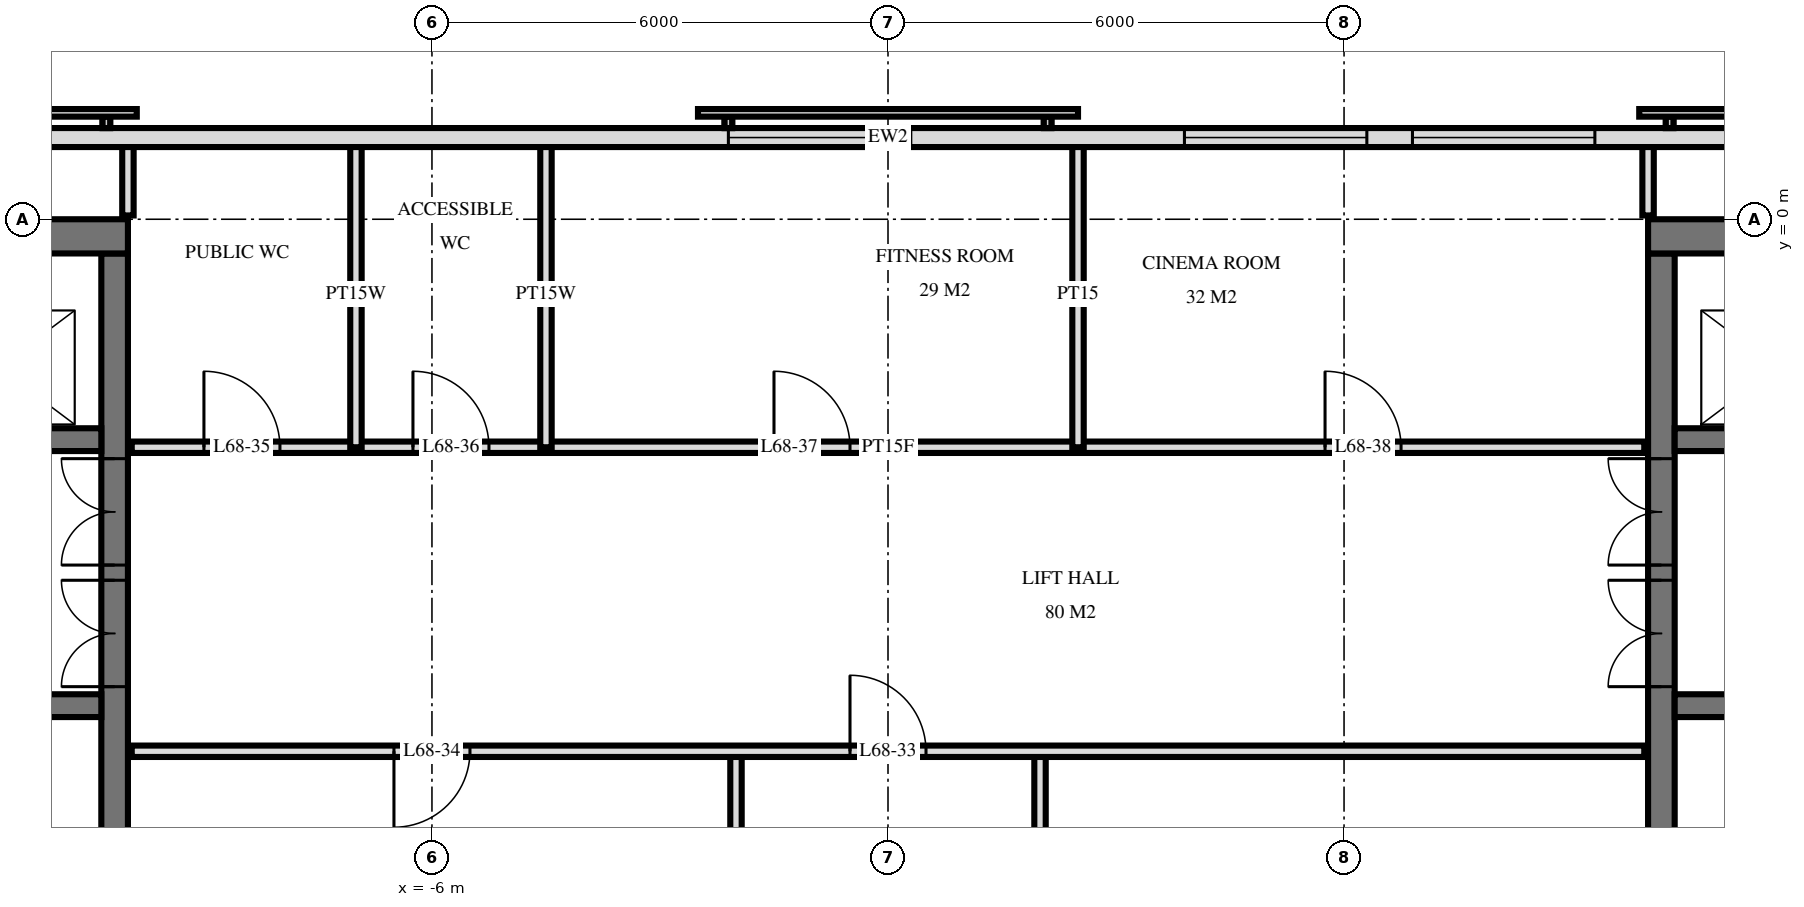
"""IFC4 building model, lengths in metres.
Left out: names, types, materials, properties, quantities, classifications, styles, units other than length and angle.
Written with IfcOpenShell. Run it as: python <this file> out.ifc"""

import sys

from ifc_helpers import new_model, si_unit, direction, frame, frame_2d, origin, place, context, subcontext, project, spatial, rectangle, extrude, element, fill, save


model = new_model("IFC4")
c1 = context("Model", 3, precision=1e-05, world=origin(), true_north=direction((0.0, 1.0)))
c2 = subcontext(c1, "Body", "Model", "MODEL_VIEW")
j1 = project(units=[si_unit("LENGTHUNIT", "METRE"), si_unit("PLANEANGLEUNIT", "RADIAN")], contexts=[c1])
p1 = place(None, origin())
s1 = spatial("IfcSite", under=j1, at=p1, CompositionType="ELEMENT")
p2 = place(p1, origin())
s2 = spatial("IfcBuilding", under=s1, at=p2, CompositionType="ELEMENT")
p3 = place(p2, frame((0.0, 0.0, 259.6)))
s3 = spatial("IfcBuildingStorey", under=s2, at=p3, CompositionType="ELEMENT", Elevation=259.6)
p4 = place(p3, frame((-19.5, -0.225, 0.0), z_axis=(0.0, 0.0, 1.0), x_axis=(1.0, 0.0, 0.0)))
e1 = element("IfcWall", 1, at=p4, inside=s3, PredefinedType="SHEAR", context=c2, shape_type="SweptSolid", body=[
    extrude(rectangle(XDim=9.5, YDim=0.45, at=frame_2d((4.75, 0.0))), origin(), (0.0, 0.0, 1.0), 3.5),
])
p5 = place(p3, frame((-10.175, -14.55, 0.0), z_axis=(0.0, 0.0, 1.0), x_axis=(0.0, 1.0, 0.0)))
e2 = element("IfcWall", 2, at=p5, inside=s3, PredefinedType="SHEAR", context=c2, shape_type="SweptSolid", body=[
    extrude(rectangle(XDim=14.1, YDim=0.35, at=frame_2d((7.05, 0.0))), origin(), (0.0, 0.0, 1.0), 3.5),
])
p6 = place(p5, frame((8.4, 0.0, 0.0)))
e3 = element("IfcOpeningElement", 3, at=p6, cuts=e2, PredefinedType="OPENING", context=c2, shape_type="SweptSolid", body=[
    extrude(rectangle(XDim=1.4, YDim=2.4, at=frame_2d((0.7, 1.2))), frame((0.0, 0.185, 0.0), z_axis=(0.0, -1.0, 0.0), x_axis=(1.0, 0.0, 0.0)), (0.0, 0.0, 1.0), 0.37),
])
p7 = place(p5, frame((10.0, 0.0, 0.0)))
e4 = element("IfcOpeningElement", 4, at=p7, cuts=e2, PredefinedType="OPENING", context=c2, shape_type="SweptSolid", body=[
    extrude(rectangle(XDim=1.4, YDim=2.4, at=frame_2d((0.7, 1.2))), frame((0.0, 0.185, 0.0), z_axis=(0.0, -1.0, 0.0), x_axis=(1.0, 0.0, 0.0)), (0.0, 0.0, 1.0), 0.37),
])
p8 = place(p5, frame((4.0, 0.0, 0.0)))
e5 = element("IfcOpeningElement", 5, at=p8, cuts=e2, PredefinedType="OPENING", context=c2, shape_type="SweptSolid", body=[
    extrude(rectangle(XDim=1.2, YDim=2.1, at=frame_2d((0.6, 1.05))), frame((0.0, 0.185, 0.0), z_axis=(0.0, -1.0, 0.0), x_axis=(1.0, 0.0, 0.0)), (0.0, 0.0, 1.0), 0.37),
])
p9 = place(p3, frame((-19.05, -2.9, 0.0), z_axis=(0.0, 0.0, 1.0), x_axis=(1.0, 0.0, 0.0)))
e6 = element("IfcWall", 6, at=p9, inside=s3, PredefinedType="SHEAR", context=c2, shape_type="SweptSolid", body=[
    extrude(rectangle(XDim=8.7, YDim=0.3, at=frame_2d((4.35, 0.0))), origin(), (0.0, 0.0, 1.0), 3.5),
])
p10 = place(p9, frame((6.8, 0.0, 0.0)))
e7 = element("IfcOpeningElement", 7, at=p10, cuts=e6, PredefinedType="OPENING", context=c2, shape_type="SweptSolid", body=[
    extrude(rectangle(XDim=1.1, YDim=2.1, at=frame_2d((0.55, 1.05))), frame((0.0, 0.16, 0.0), z_axis=(0.0, -1.0, 0.0), x_axis=(1.0, 0.0, 0.0)), (0.0, 0.0, 1.0), 0.32),
])
p11 = place(p9, frame((3.8, 0.0, 0.0)))
e8 = element("IfcOpeningElement", 8, at=p11, cuts=e6, PredefinedType="OPENING", context=c2, shape_type="SweptSolid", body=[
    extrude(rectangle(XDim=1.1, YDim=2.1, at=frame_2d((0.55, 1.05))), frame((0.0, 0.16, 0.0), z_axis=(0.0, -1.0, 0.0), x_axis=(1.0, 0.0, 0.0)), (0.0, 0.0, 1.0), 0.32),
])
p12 = place(p9, frame((1.863, 0.0, 0.0)))
e9 = element("IfcOpeningElement", 9, at=p12, cuts=e6, PredefinedType="OPENING", context=c2, shape_type="SweptSolid", body=[
    extrude(rectangle(XDim=0.9, YDim=2.1, at=frame_2d((0.45, 1.05))), frame((0.0, 0.16, 0.0), z_axis=(0.0, -1.0, 0.0), x_axis=(1.0, 0.0, 0.0)), (0.0, 0.0, 1.0), 0.32),
])
p13 = place(p9, frame((0.438, 0.0, 0.0)))
e10 = element("IfcOpeningElement", 10, at=p13, cuts=e6, PredefinedType="OPENING", context=c2, shape_type="SweptSolid", body=[
    extrude(rectangle(XDim=0.9, YDim=2.1, at=frame_2d((0.45, 1.05))), frame((0.0, 0.16, 0.0), z_axis=(0.0, -1.0, 0.0), x_axis=(1.0, 0.0, 0.0)), (0.0, 0.0, 1.0), 0.32),
])
p14 = place(p3, frame((-19.05, -6.4, 0.0), z_axis=(0.0, 0.0, 1.0), x_axis=(1.0, 0.0, 0.0)))
e11 = element("IfcWall", 11, at=p14, inside=s3, PredefinedType="SHEAR", context=c2, shape_type="SweptSolid", body=[
    extrude(rectangle(XDim=8.7, YDim=0.3, at=frame_2d((4.35, 0.0))), origin(), (0.0, 0.0, 1.0), 3.5),
])
p15 = place(p14, frame((0.8, 0.0, 0.0)))
e12 = element("IfcOpeningElement", 12, at=p15, cuts=e11, PredefinedType="OPENING", context=c2, shape_type="SweptSolid", body=[
    extrude(rectangle(XDim=1.1, YDim=2.1, at=frame_2d((0.55, 1.05))), frame((0.0, 0.16, 0.0), z_axis=(0.0, -1.0, 0.0), x_axis=(1.0, 0.0, 0.0)), (0.0, 0.0, 1.0), 0.32),
])
p16 = place(p3, frame((10.0, -0.225, 0.0), z_axis=(0.0, 0.0, 1.0), x_axis=(1.0, 0.0, 0.0)))
e13 = element("IfcWall", 13, at=p16, inside=s3, PredefinedType="SHEAR", context=c2, shape_type="SweptSolid", body=[
    extrude(rectangle(XDim=9.5, YDim=0.45, at=frame_2d((4.75, 0.0))), origin(), (0.0, 0.0, 1.0), 3.5),
])
p17 = place(p3, frame((10.175, -14.55, 0.0), z_axis=(0.0, 0.0, 1.0), x_axis=(0.0, 1.0, 0.0)))
e14 = element("IfcWall", 14, at=p17, inside=s3, PredefinedType="SHEAR", context=c2, shape_type="SweptSolid", body=[
    extrude(rectangle(XDim=14.1, YDim=0.35, at=frame_2d((7.05, 0.0))), origin(), (0.0, 0.0, 1.0), 3.5),
])
p18 = place(p17, frame((8.4, 0.0, 0.0)))
e15 = element("IfcOpeningElement", 15, at=p18, cuts=e14, PredefinedType="OPENING", context=c2, shape_type="SweptSolid", body=[
    extrude(rectangle(XDim=1.4, YDim=2.4, at=frame_2d((0.7, 1.2))), frame((0.0, 0.185, 0.0), z_axis=(0.0, -1.0, 0.0), x_axis=(1.0, 0.0, 0.0)), (0.0, 0.0, 1.0), 0.37),
])
p19 = place(p17, frame((10.0, 0.0, 0.0)))
e16 = element("IfcOpeningElement", 16, at=p19, cuts=e14, PredefinedType="OPENING", context=c2, shape_type="SweptSolid", body=[
    extrude(rectangle(XDim=1.4, YDim=2.4, at=frame_2d((0.7, 1.2))), frame((0.0, 0.185, 0.0), z_axis=(0.0, -1.0, 0.0), x_axis=(1.0, 0.0, 0.0)), (0.0, 0.0, 1.0), 0.37),
])
p20 = place(p17, frame((4.0, 0.0, 0.0)))
e17 = element("IfcOpeningElement", 17, at=p20, cuts=e14, PredefinedType="OPENING", context=c2, shape_type="SweptSolid", body=[
    extrude(rectangle(XDim=1.2, YDim=2.1, at=frame_2d((0.6, 1.05))), frame((0.0, 0.185, 0.0), z_axis=(0.0, -1.0, 0.0), x_axis=(1.0, 0.0, 0.0)), (0.0, 0.0, 1.0), 0.37),
])
p21 = place(p3, frame((10.35, -2.9, 0.0), z_axis=(0.0, 0.0, 1.0), x_axis=(1.0, 0.0, 0.0)))
e18 = element("IfcWall", 18, at=p21, inside=s3, PredefinedType="SHEAR", context=c2, shape_type="SweptSolid", body=[
    extrude(rectangle(XDim=8.7, YDim=0.3, at=frame_2d((4.35, 0.0))), origin(), (0.0, 0.0, 1.0), 3.5),
])
p22 = place(p21, frame((0.8, 0.0, 0.0)))
e19 = element("IfcOpeningElement", 19, at=p22, cuts=e18, PredefinedType="OPENING", context=c2, shape_type="SweptSolid", body=[
    extrude(rectangle(XDim=1.1, YDim=2.1, at=frame_2d((0.55, 1.05))), frame((0.0, 0.16, 0.0), z_axis=(0.0, -1.0, 0.0), x_axis=(1.0, 0.0, 0.0)), (0.0, 0.0, 1.0), 0.32),
])
p23 = place(p21, frame((3.8, 0.0, 0.0)))
e20 = element("IfcOpeningElement", 20, at=p23, cuts=e18, PredefinedType="OPENING", context=c2, shape_type="SweptSolid", body=[
    extrude(rectangle(XDim=1.1, YDim=2.1, at=frame_2d((0.55, 1.05))), frame((0.0, 0.16, 0.0), z_axis=(0.0, -1.0, 0.0), x_axis=(1.0, 0.0, 0.0)), (0.0, 0.0, 1.0), 0.32),
])
p24 = place(p21, frame((5.938, 0.0, 0.0)))
e21 = element("IfcOpeningElement", 21, at=p24, cuts=e18, PredefinedType="OPENING", context=c2, shape_type="SweptSolid", body=[
    extrude(rectangle(XDim=0.9, YDim=2.1, at=frame_2d((0.45, 1.05))), frame((0.0, 0.16, 0.0), z_axis=(0.0, -1.0, 0.0), x_axis=(1.0, 0.0, 0.0)), (0.0, 0.0, 1.0), 0.32),
])
p25 = place(p21, frame((7.363, 0.0, 0.0)))
e22 = element("IfcOpeningElement", 22, at=p25, cuts=e18, PredefinedType="OPENING", context=c2, shape_type="SweptSolid", body=[
    extrude(rectangle(XDim=0.9, YDim=2.1, at=frame_2d((0.45, 1.05))), frame((0.0, 0.16, 0.0), z_axis=(0.0, -1.0, 0.0), x_axis=(1.0, 0.0, 0.0)), (0.0, 0.0, 1.0), 0.32),
])
p26 = place(p3, frame((10.35, -6.4, 0.0), z_axis=(0.0, 0.0, 1.0), x_axis=(1.0, 0.0, 0.0)))
e23 = element("IfcWall", 23, at=p26, inside=s3, PredefinedType="SHEAR", context=c2, shape_type="SweptSolid", body=[
    extrude(rectangle(XDim=8.7, YDim=0.3, at=frame_2d((4.35, 0.0))), origin(), (0.0, 0.0, 1.0), 3.5),
])
p27 = place(p26, frame((6.8, 0.0, 0.0)))
e24 = element("IfcOpeningElement", 24, at=p27, cuts=e23, PredefinedType="OPENING", context=c2, shape_type="SweptSolid", body=[
    extrude(rectangle(XDim=1.1, YDim=2.1, at=frame_2d((0.55, 1.05))), frame((0.0, 0.16, 0.0), z_axis=(0.0, -1.0, 0.0), x_axis=(1.0, 0.0, 0.0)), (0.0, 0.0, 1.0), 0.32),
])
p28 = place(p3, frame((18.575, 1.075, 0.0), z_axis=(0.0, 0.0, 1.0), x_axis=(-1.0, 0.0, 0.0)))
e25 = element("IfcWall", 25, at=p28, inside=s3, PredefinedType="SOLIDWALL", context=c2, shape_type="SweptSolid", body=[
    extrude(rectangle(XDim=37.151, YDim=0.25, at=frame_2d((18.575, 0.0))), origin(), (0.0, 0.0, 1.0), 3.22),
])
p29 = place(p28, frame((9.275, 0.0, 0.9)))
e26 = element("IfcOpeningElement", 26, at=p29, cuts=e25, PredefinedType="OPENING", context=c2, shape_type="SweptSolid", body=[
    extrude(rectangle(XDim=2.4, YDim=1.5, at=frame_2d((1.2, 0.75))), frame((0.0, 0.135, 0.0), z_axis=(0.0, -1.0, 0.0), x_axis=(1.0, 0.0, 0.0)), (0.0, 0.0, 1.0), 0.27),
])
p30 = place(p28, frame((12.275, 0.0, 0.9)))
e27 = element("IfcOpeningElement", 27, at=p30, cuts=e25, PredefinedType="OPENING", context=c2, shape_type="SweptSolid", body=[
    extrude(rectangle(XDim=2.4, YDim=1.5, at=frame_2d((1.2, 0.75))), frame((0.0, 0.135, 0.0), z_axis=(0.0, -1.0, 0.0), x_axis=(1.0, 0.0, 0.0)), (0.0, 0.0, 1.0), 0.27),
])
p31 = place(p28, frame((18.275, 0.0, 0.9)))
e28 = element("IfcOpeningElement", 28, at=p31, cuts=e25, PredefinedType="OPENING", context=c2, shape_type="SweptSolid", body=[
    extrude(rectangle(XDim=2.4, YDim=1.5, at=frame_2d((1.2, 0.75))), frame((0.0, 0.135, 0.0), z_axis=(0.0, -1.0, 0.0), x_axis=(1.0, 0.0, 0.0)), (0.0, 0.0, 1.0), 0.27),
])
p32 = place(p3, frame((10.0, 0.05, 0.0), z_axis=(0.0, 0.0, 1.0), x_axis=(0.0, 1.0, 0.0)))
e29 = element("IfcWall", 29, at=p32, inside=s3, PredefinedType="PARTITIONING", context=c2, shape_type="SweptSolid", body=[
    extrude(rectangle(XDim=0.97, YDim=0.15, at=frame_2d((0.485, 0.0))), origin(), (0.0, 0.0, 1.0), 3.22),
])
p33 = place(p3, frame((2.5, -3.0, 0.0), z_axis=(0.0, 0.0, 1.0), x_axis=(0.0, 1.0, 0.0)))
e30 = element("IfcWall", 30, at=p33, inside=s3, PredefinedType="PARTITIONING", context=c2, shape_type="SweptSolid", body=[
    extrude(rectangle(XDim=4.02, YDim=0.15, at=frame_2d((2.01, 0.0))), origin(), (0.0, 0.0, 1.0), 3.22),
])
for number, where, z_axis, x_axis in (
    (31, (2.0, -11.0, 0.0), (0.0, 0.0, 1.0), (0.0, 1.0, 0.0)),
    (32, (-2.0, -11.0, 0.0), (0.0, 0.0, 1.0), (0.0, 1.0, 0.0)),
):
    element("IfcWall", number, at=place(p3, frame(where, z_axis=z_axis, x_axis=x_axis)), inside=s3, PredefinedType="PARTITIONING", context=c2, shape_type="SweptSolid", body=[
        extrude(rectangle(XDim=4.0, YDim=0.15, at=frame_2d((2.0, 0.0))), origin(), (0.0, 0.0, 1.0), 3.22),
    ])
for number, where, z_axis, x_axis in (
    (33, (-4.5, -3.0, 0.0), (0.0, 0.0, 1.0), (0.0, 1.0, 0.0)),
    (34, (-7.0, -3.0, 0.0), (0.0, 0.0, 1.0), (0.0, 1.0, 0.0)),
):
    element("IfcWall", number, at=place(p3, frame(where, z_axis=z_axis, x_axis=x_axis)), inside=s3, PredefinedType="PLUMBINGWALL", context=c2, shape_type="SweptSolid", body=[
        extrude(rectangle(XDim=4.02, YDim=0.15, at=frame_2d((2.01, 0.0))), origin(), (0.0, 0.0, 1.0), 3.22),
    ])
p34 = place(p3, frame((-10.0, 0.05, 0.0), z_axis=(0.0, 0.0, 1.0), x_axis=(0.0, 1.0, 0.0)))
e35 = element("IfcWall", 35, at=p34, inside=s3, PredefinedType="PLUMBINGWALL", context=c2, shape_type="SweptSolid", body=[
    extrude(rectangle(XDim=0.97, YDim=0.15, at=frame_2d((0.485, 0.0))), origin(), (0.0, 0.0, 1.0), 3.22),
])
p35 = place(p3, frame((-9.95, -7.0, 0.0), z_axis=(0.0, 0.0, 1.0), x_axis=(1.0, 0.0, 0.0)))
e36 = element("IfcWall", 36, at=p35, inside=s3, PredefinedType="PARTITIONING", context=c2, shape_type="SweptSolid", body=[
    extrude(rectangle(XDim=19.9, YDim=0.15, at=frame_2d((9.95, 0.0))), origin(), (0.0, 0.0, 1.0), 3.22),
])
p36 = place(p35, frame((9.45, 0.0, 0.0)))
e37 = element("IfcOpeningElement", 37, at=p36, cuts=e36, PredefinedType="OPENING", context=c2, shape_type="SweptSolid", body=[
    extrude(rectangle(XDim=1.0, YDim=2.1, at=frame_2d((0.5, 1.05))), frame((0.0, 0.085, 0.0), z_axis=(0.0, -1.0, 0.0), x_axis=(1.0, 0.0, 0.0)), (0.0, 0.0, 1.0), 0.17),
])
p37 = place(p35, frame((3.45, 0.0, 0.0)))
e38 = element("IfcOpeningElement", 38, at=p37, cuts=e36, PredefinedType="OPENING", context=c2, shape_type="SweptSolid", body=[
    extrude(rectangle(XDim=1.0, YDim=2.1, at=frame_2d((0.5, 1.05))), frame((0.0, 0.085, 0.0), z_axis=(0.0, -1.0, 0.0), x_axis=(1.0, 0.0, 0.0)), (0.0, 0.0, 1.0), 0.17),
])
p38 = place(p3, frame((-9.95, -3.0, 0.0), z_axis=(0.0, 0.0, 1.0), x_axis=(1.0, 0.0, 0.0)))
e39 = element("IfcWall", 39, at=p38, inside=s3, PredefinedType="PARTITIONING", context=c2, shape_type="SweptSolid", body=[
    extrude(rectangle(XDim=19.9, YDim=0.15, at=frame_2d((9.95, 0.0))), origin(), (0.0, 0.0, 1.0), 3.22),
])
p39 = place(p38, frame((0.95, 0.0, 0.0)))
e40 = element("IfcOpeningElement", 40, at=p39, cuts=e39, PredefinedType="OPENING", context=c2, shape_type="SweptSolid", body=[
    extrude(rectangle(XDim=1.0, YDim=2.1, at=frame_2d((0.5, 1.05))), frame((0.0, 0.085, 0.0), z_axis=(0.0, -1.0, 0.0), x_axis=(1.0, 0.0, 0.0)), (0.0, 0.0, 1.0), 0.17),
])
p40 = place(p38, frame((3.7, 0.0, 0.0)))
e41 = element("IfcOpeningElement", 41, at=p40, cuts=e39, PredefinedType="OPENING", context=c2, shape_type="SweptSolid", body=[
    extrude(rectangle(XDim=1.0, YDim=2.1, at=frame_2d((0.5, 1.05))), frame((0.0, 0.085, 0.0), z_axis=(0.0, -1.0, 0.0), x_axis=(1.0, 0.0, 0.0)), (0.0, 0.0, 1.0), 0.17),
])
p41 = place(p38, frame((8.45, 0.0, 0.0)))
e42 = element("IfcOpeningElement", 42, at=p41, cuts=e39, PredefinedType="OPENING", context=c2, shape_type="SweptSolid", body=[
    extrude(rectangle(XDim=1.0, YDim=2.1, at=frame_2d((0.5, 1.05))), frame((0.0, 0.085, 0.0), z_axis=(0.0, -1.0, 0.0), x_axis=(1.0, 0.0, 0.0)), (0.0, 0.0, 1.0), 0.17),
])
p42 = place(p38, frame((15.7, 0.0, 0.0)))
e43 = element("IfcOpeningElement", 43, at=p42, cuts=e39, PredefinedType="OPENING", context=c2, shape_type="SweptSolid", body=[
    extrude(rectangle(XDim=1.0, YDim=2.1, at=frame_2d((0.5, 1.05))), frame((0.0, 0.085, 0.0), z_axis=(0.0, -1.0, 0.0), x_axis=(1.0, 0.0, 0.0)), (0.0, 0.0, 1.0), 0.17),
])
p43 = place(p29, origin())
e44 = element("IfcWindow", 44, at=p43, inside=s3, PartitioningType="SINGLE_PANEL", PredefinedType="WINDOW", context=c2, shape_type="SweptSolid", body=[
    extrude(rectangle(XDim=2.4, YDim=1.5, at=frame_2d((1.2, 0.75))), frame((0.0, 0.03, 0.0), z_axis=(0.0, -1.0, 0.0), x_axis=(1.0, 0.0, 0.0)), (0.0, 0.0, 1.0), 0.06),
])
fill(e26, e44)
p44 = place(p30, origin())
e45 = element("IfcWindow", 45, at=p44, inside=s3, PartitioningType="SINGLE_PANEL", PredefinedType="WINDOW", context=c2, shape_type="SweptSolid", body=[
    extrude(rectangle(XDim=2.4, YDim=1.5, at=frame_2d((1.2, 0.75))), frame((0.0, 0.03, 0.0), z_axis=(0.0, -1.0, 0.0), x_axis=(1.0, 0.0, 0.0)), (0.0, 0.0, 1.0), 0.06),
])
fill(e27, e45)
p45 = place(p31, origin())
e46 = element("IfcWindow", 46, at=p45, inside=s3, PartitioningType="SINGLE_PANEL", PredefinedType="WINDOW", context=c2, shape_type="SweptSolid", body=[
    extrude(rectangle(XDim=2.4, YDim=1.5, at=frame_2d((1.2, 0.75))), frame((0.0, 0.03, 0.0), z_axis=(0.0, -1.0, 0.0), x_axis=(1.0, 0.0, 0.0)), (0.0, 0.0, 1.0), 0.06),
])
fill(e28, e46)
p46 = place(p6, origin())
e47 = element("IfcDoor", 47, at=p46, inside=s3, OperationType="DOUBLE_DOOR_SINGLE_SWING", PredefinedType="DOOR", context=c2, shape_type="SweptSolid", body=[
    extrude(rectangle(XDim=1.4, YDim=2.4, at=frame_2d((0.7, 1.2))), frame((0.0, 0.025, 0.0), z_axis=(0.0, -1.0, 0.0), x_axis=(1.0, 0.0, 0.0)), (0.0, 0.0, 1.0), 0.05),
])
fill(e3, e47)
p47 = place(p7, origin())
e48 = element("IfcDoor", 48, at=p47, inside=s3, OperationType="DOUBLE_DOOR_SINGLE_SWING", PredefinedType="DOOR", context=c2, shape_type="SweptSolid", body=[
    extrude(rectangle(XDim=1.4, YDim=2.4, at=frame_2d((0.7, 1.2))), frame((0.0, 0.025, 0.0), z_axis=(0.0, -1.0, 0.0), x_axis=(1.0, 0.0, 0.0)), (0.0, 0.0, 1.0), 0.05),
])
fill(e4, e48)
p48 = place(p18, origin())
e49 = element("IfcDoor", 49, at=p48, inside=s3, OperationType="DOUBLE_DOOR_SINGLE_SWING", PredefinedType="DOOR", context=c2, shape_type="SweptSolid", body=[
    extrude(rectangle(XDim=1.4, YDim=2.4, at=frame_2d((0.7, 1.2))), frame((0.0, 0.025, 0.0), z_axis=(0.0, -1.0, 0.0), x_axis=(1.0, 0.0, 0.0)), (0.0, 0.0, 1.0), 0.05),
])
fill(e15, e49)
p49 = place(p19, origin())
e50 = element("IfcDoor", 50, at=p49, inside=s3, OperationType="DOUBLE_DOOR_SINGLE_SWING", PredefinedType="DOOR", context=c2, shape_type="SweptSolid", body=[
    extrude(rectangle(XDim=1.4, YDim=2.4, at=frame_2d((0.7, 1.2))), frame((0.0, 0.025, 0.0), z_axis=(0.0, -1.0, 0.0), x_axis=(1.0, 0.0, 0.0)), (0.0, 0.0, 1.0), 0.05),
])
fill(e16, e50)
p50 = place(p36, origin())
e51 = element("IfcDoor", 51, at=p50, inside=s3, OperationType="SINGLE_SWING_RIGHT", PredefinedType="DOOR", context=c2, shape_type="SweptSolid", body=[
    extrude(rectangle(XDim=1.0, YDim=2.1, at=frame_2d((0.5, 1.05))), frame((0.0, 0.025, 0.0), z_axis=(0.0, -1.0, 0.0), x_axis=(1.0, 0.0, 0.0)), (0.0, 0.0, 1.0), 0.05),
])
fill(e37, e51)
p51 = place(p37, frame((0.5, 0.0, 0.0), z_axis=(0.0, 0.0, 1.0), x_axis=(-1.0, 0.0, 0.0)))
e52 = element("IfcDoor", 52, at=p51, inside=s3, OperationType="SINGLE_SWING_LEFT", PredefinedType="DOOR", context=c2, shape_type="SweptSolid", body=[
    extrude(rectangle(XDim=1.0, YDim=2.1, at=frame_2d((0.0, 1.05))), frame((0.0, -0.025, 0.0), z_axis=(0.0, 1.0, 0.0), x_axis=(-1.0, 0.0, 0.0)), (0.0, 0.0, 1.0), 0.05),
])
fill(e38, e52)
p52 = place(p39, origin())
e53 = element("IfcDoor", 53, at=p52, inside=s3, OperationType="SINGLE_SWING_RIGHT", PredefinedType="DOOR", context=c2, shape_type="SweptSolid", body=[
    extrude(rectangle(XDim=1.0, YDim=2.1, at=frame_2d((0.5, 1.05))), frame((0.0, 0.025, 0.0), z_axis=(0.0, -1.0, 0.0), x_axis=(1.0, 0.0, 0.0)), (0.0, 0.0, 1.0), 0.05),
])
fill(e40, e53)
p53 = place(p40, origin())
e54 = element("IfcDoor", 54, at=p53, inside=s3, OperationType="SINGLE_SWING_RIGHT", PredefinedType="DOOR", context=c2, shape_type="SweptSolid", body=[
    extrude(rectangle(XDim=1.0, YDim=2.1, at=frame_2d((0.5, 1.05))), frame((0.0, 0.025, 0.0), z_axis=(0.0, -1.0, 0.0), x_axis=(1.0, 0.0, 0.0)), (0.0, 0.0, 1.0), 0.05),
])
fill(e41, e54)
p54 = place(p41, origin())
e55 = element("IfcDoor", 55, at=p54, inside=s3, OperationType="SINGLE_SWING_RIGHT", PredefinedType="DOOR", context=c2, shape_type="SweptSolid", body=[
    extrude(rectangle(XDim=1.0, YDim=2.1, at=frame_2d((0.5, 1.05))), frame((0.0, 0.025, 0.0), z_axis=(0.0, -1.0, 0.0), x_axis=(1.0, 0.0, 0.0)), (0.0, 0.0, 1.0), 0.05),
])
fill(e42, e55)
p55 = place(p42, origin())
e56 = element("IfcDoor", 56, at=p55, inside=s3, OperationType="SINGLE_SWING_RIGHT", PredefinedType="DOOR", context=c2, shape_type="SweptSolid", body=[
    extrude(rectangle(XDim=1.0, YDim=2.1, at=frame_2d((0.5, 1.05))), frame((0.0, 0.025, 0.0), z_axis=(0.0, -1.0, 0.0), x_axis=(1.0, 0.0, 0.0)), (0.0, 0.0, 1.0), 0.05),
])
fill(e43, e56)
save(model, sys.argv[1])
